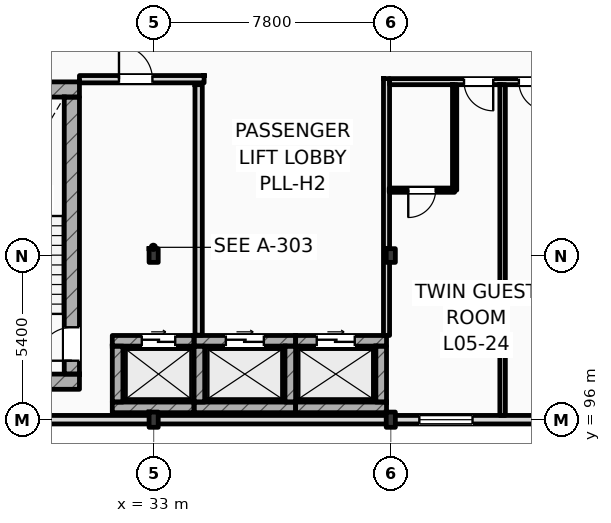
"""IFC4 building model, lengths in metres.
Left out: names, types, materials, properties, quantities, classifications, styles, units other than length and angle.
Written with IfcOpenShell. Run it as: python <this file> out.ifc"""

import sys

from ifc_helpers import new_model, si_unit, direction, frame, frame_2d, origin, origin_2d, place, context, subcontext, project, spatial, rectangle, i_section, extrude, element, fill, save


model = new_model("IFC4")
c1 = context("Model", 3, precision=1e-05, world=origin(), true_north=direction((0.0, 1.0)))
c2 = subcontext(c1, "Body", "Model", "MODEL_VIEW")
j1 = project(units=[si_unit("LENGTHUNIT", "METRE"), si_unit("PLANEANGLEUNIT", "RADIAN")], contexts=[c1])
p1 = place(None, origin())
s1 = spatial("IfcSite", under=j1, at=p1, CompositionType="ELEMENT")
p2 = place(p1, origin())
s2 = spatial("IfcBuilding", under=s1, at=p2, CompositionType="ELEMENT")
p3 = place(p2, frame((0.0, 0.0, 24.6)))
s3 = spatial("IfcBuildingStorey", under=s2, at=p3, CompositionType="ELEMENT", Elevation=24.6)
p4 = place(p3, frame((33.0, 96.0, 0.0), z_axis=(0.0, 0.0, 1.0), x_axis=(1.0, 0.0, 0.0)))
e1 = element("IfcColumn", 1, at=p4, inside=s3, PredefinedType="COLUMN", context=c2, shape_type="SweptSolid", body=[
    extrude(i_section(OverallWidth=0.3, OverallDepth=0.5, WebThickness=0.014, FlangeThickness=0.028, FilletRadius=0.027, at=origin_2d()), origin(), (0.0, 0.0, 1.0), 3.6),
])
p5 = place(p3, frame((33.0, 101.4, 0.0), z_axis=(0.0, 0.0, 1.0), x_axis=(1.0, 0.0, 0.0)))
e2 = element("IfcColumn", 2, at=p5, inside=s3, PredefinedType="COLUMN", context=c2, shape_type="SweptSolid", body=[
    extrude(i_section(OverallWidth=0.3, OverallDepth=0.45, WebThickness=0.014, FlangeThickness=0.026, FilletRadius=0.027, at=origin_2d()), origin(), (0.0, 0.0, 1.0), 3.6),
])
p6 = place(p3, frame((40.8, 96.0, 0.0), z_axis=(0.0, 0.0, 1.0), x_axis=(1.0, 0.0, 0.0)))
e3 = element("IfcColumn", 3, at=p6, inside=s3, PredefinedType="COLUMN", context=c2, shape_type="SweptSolid", body=[
    extrude(i_section(OverallWidth=0.3, OverallDepth=0.5, WebThickness=0.014, FlangeThickness=0.028, FilletRadius=0.027, at=origin_2d()), origin(), (0.0, 0.0, 1.0), 3.6),
])
p7 = place(p3, frame((40.8, 101.4, 0.0), z_axis=(0.0, 0.0, 1.0), x_axis=(1.0, 0.0, 0.0)))
e4 = element("IfcColumn", 4, at=p7, inside=s3, PredefinedType="COLUMN", context=c2, shape_type="SweptSolid", body=[
    extrude(i_section(OverallWidth=0.3, OverallDepth=0.45, WebThickness=0.014, FlangeThickness=0.026, FilletRadius=0.027, at=origin_2d()), origin(), (0.0, 0.0, 1.0), 3.6),
])
for number, where, z_axis, x_axis in (
    (5, (25.4, 106.862, 0.0), (0.0, 0.0, 1.0), (1.0, 0.0, 0.0)),
    (6, (25.4, 97.25, 0.0), (0.0, 0.0, 1.0), (1.0, 0.0, 0.0)),
):
    element("IfcWall", number, at=place(p3, frame(where, z_axis=z_axis, x_axis=x_axis)), inside=s3, PredefinedType="SHEAR", context=c2, shape_type="SweptSolid", body=[
        extrude(rectangle(XDim=5.16, YDim=0.5, at=frame_2d((2.58, 0.0))), origin(), (0.0, 0.0, 1.0), 3.6),
    ])
p8 = place(p3, frame((30.31, 97.5, 0.0), z_axis=(0.0, 0.0, 1.0), x_axis=(0.0, 1.0, 0.0)))
e7 = element("IfcWall", 7, at=p8, inside=s3, PredefinedType="SHEAR", context=c2, shape_type="SweptSolid", body=[
    extrude(rectangle(XDim=9.112, YDim=0.5, at=frame_2d((4.556, 0.0))), origin(), (0.0, 0.0, 1.0), 3.6),
])
p9 = place(p8, frame((0.44, 0.0, 0.0)))
e8 = element("IfcOpeningElement", 8, at=p9, cuts=e7, PredefinedType="OPENING", context=c2, shape_type="SweptSolid", body=[
    extrude(rectangle(XDim=1.1, YDim=2.2, at=frame_2d((0.55, 1.1))), frame((0.0, 0.26, 0.0), z_axis=(0.0, -1.0, 0.0), x_axis=(1.0, 0.0, 0.0)), (0.0, 0.0, 1.0), 0.52),
])
p10 = place(p3, frame((25.2, 96.0, 0.0), z_axis=(0.0, 0.0, 1.0), x_axis=(1.0, 0.0, 0.0)))
e9 = element("IfcWall", 9, at=p10, inside=s3, PredefinedType="STANDARD", context=c2, shape_type="SweptSolid", body=[
    extrude(rectangle(XDim=94.8, YDim=0.28, at=frame_2d((47.4, 0.0))), origin(), (0.0, 0.0, 1.0), 2.78),
])
p11 = place(p10, frame((16.539, 0.0, 0.9)))
e10 = element("IfcOpeningElement", 10, at=p11, cuts=e9, PredefinedType="OPENING", context=c2, shape_type="SweptSolid", body=[
    extrude(rectangle(XDim=1.75, YDim=1.7, at=frame_2d((0.875, 0.85))), frame((0.0, 0.15, 0.0), z_axis=(0.0, -1.0, 0.0), x_axis=(1.0, 0.0, 0.0)), (0.0, 0.0, 1.0), 0.3),
])
p12 = place(p10, frame((20.367, 0.0, 0.9)))
e11 = element("IfcOpeningElement", 11, at=p12, cuts=e9, PredefinedType="OPENING", context=c2, shape_type="SweptSolid", body=[
    extrude(rectangle(XDim=2.0, YDim=1.7, at=frame_2d((1.0, 0.85))), frame((0.0, 0.15, 0.0), z_axis=(0.0, -1.0, 0.0), x_axis=(1.0, 0.0, 0.0)), (0.0, 0.0, 1.0), 0.3),
])
p13 = place(p10, frame((24.326, 0.0, 0.9)))
e12 = element("IfcOpeningElement", 12, at=p13, cuts=e9, PredefinedType="OPENING", context=c2, shape_type="SweptSolid", body=[
    extrude(rectangle(XDim=2.3, YDim=1.7, at=frame_2d((1.15, 0.85))), frame((0.0, 0.15, 0.0), z_axis=(0.0, -1.0, 0.0), x_axis=(1.0, 0.0, 0.0)), (0.0, 0.0, 1.0), 0.3),
])
p14 = place(p10, frame((27.684, 0.0, 0.9)))
e13 = element("IfcOpeningElement", 13, at=p14, cuts=e9, PredefinedType="OPENING", context=c2, shape_type="SweptSolid", body=[
    extrude(rectangle(XDim=2.6, YDim=1.7, at=frame_2d((1.3, 0.85))), frame((0.0, 0.15, 0.0), z_axis=(0.0, -1.0, 0.0), x_axis=(1.0, 0.0, 0.0)), (0.0, 0.0, 1.0), 0.3),
])
p15 = place(p10, frame((32.083, 0.0, 0.9)))
e14 = element("IfcOpeningElement", 14, at=p15, cuts=e9, PredefinedType="OPENING", context=c2, shape_type="SweptSolid", body=[
    extrude(rectangle(XDim=2.419, YDim=1.7, at=frame_2d((1.209, 0.85))), frame((0.0, 0.15, 0.0), z_axis=(0.0, -1.0, 0.0), x_axis=(1.0, 0.0, 0.0)), (0.0, 0.0, 1.0), 0.3),
])
p16 = place(p10, frame((35.322, 0.0, 0.9)))
e15 = element("IfcOpeningElement", 15, at=p16, cuts=e9, PredefinedType="OPENING", context=c2, shape_type="SweptSolid", body=[
    extrude(rectangle(XDim=2.868, YDim=1.7, at=frame_2d((1.434, 0.85))), frame((0.0, 0.15, 0.0), z_axis=(0.0, -1.0, 0.0), x_axis=(1.0, 0.0, 0.0)), (0.0, 0.0, 1.0), 0.3),
])
p17 = place(p10, frame((56.015, 0.0, 0.9)))
e16 = element("IfcOpeningElement", 16, at=p17, cuts=e9, PredefinedType="OPENING", context=c2, shape_type="SweptSolid", body=[
    extrude(rectangle(XDim=1.2, YDim=1.7, at=frame_2d((0.6, 0.85))), frame((0.0, 0.15, 0.0), z_axis=(0.0, -1.0, 0.0), x_axis=(1.0, 0.0, 0.0)), (0.0, 0.0, 1.0), 0.3),
])
p18 = place(p10, frame((59.888, 0.0, 0.9)))
e17 = element("IfcOpeningElement", 17, at=p18, cuts=e9, PredefinedType="OPENING", context=c2, shape_type="SweptSolid", body=[
    extrude(rectangle(XDim=1.35, YDim=1.7, at=frame_2d((0.675, 0.85))), frame((0.0, 0.15, 0.0), z_axis=(0.0, -1.0, 0.0), x_axis=(1.0, 0.0, 0.0)), (0.0, 0.0, 1.0), 0.3),
])
p19 = place(p10, frame((63.799, 0.0, 0.9)))
e18 = element("IfcOpeningElement", 18, at=p19, cuts=e9, PredefinedType="OPENING", context=c2, shape_type="SweptSolid", body=[
    extrude(rectangle(XDim=1.5, YDim=1.7, at=frame_2d((0.75, 0.85))), frame((0.0, 0.15, 0.0), z_axis=(0.0, -1.0, 0.0), x_axis=(1.0, 0.0, 0.0)), (0.0, 0.0, 1.0), 0.3),
])
p20 = place(p10, frame((67.709, 0.0, 0.9)))
e19 = element("IfcOpeningElement", 19, at=p20, cuts=e9, PredefinedType="OPENING", context=c2, shape_type="SweptSolid", body=[
    extrude(rectangle(XDim=1.65, YDim=1.7, at=frame_2d((0.825, 0.85))), frame((0.0, 0.15, 0.0), z_axis=(0.0, -1.0, 0.0), x_axis=(1.0, 0.0, 0.0)), (0.0, 0.0, 1.0), 0.3),
])
p21 = place(p10, frame((71.618, 0.0, 0.9)))
e20 = element("IfcOpeningElement", 20, at=p21, cuts=e9, PredefinedType="OPENING", context=c2, shape_type="SweptSolid", body=[
    extrude(rectangle(XDim=1.8, YDim=1.7, at=frame_2d((0.9, 0.85))), frame((0.0, 0.15, 0.0), z_axis=(0.0, -1.0, 0.0), x_axis=(1.0, 0.0, 0.0)), (0.0, 0.0, 1.0), 0.3),
])
p22 = place(p10, frame((75.129, 0.0, 0.9)))
e21 = element("IfcOpeningElement", 21, at=p22, cuts=e9, PredefinedType="OPENING", context=c2, shape_type="SweptSolid", body=[
    extrude(rectangle(XDim=1.95, YDim=1.7, at=frame_2d((0.975, 0.85))), frame((0.0, 0.15, 0.0), z_axis=(0.0, -1.0, 0.0), x_axis=(1.0, 0.0, 0.0)), (0.0, 0.0, 1.0), 0.3),
])
p23 = place(p10, frame((79.439, 0.0, 0.9)))
e22 = element("IfcOpeningElement", 22, at=p23, cuts=e9, PredefinedType="OPENING", context=c2, shape_type="SweptSolid", body=[
    extrude(rectangle(XDim=2.1, YDim=1.7, at=frame_2d((1.05, 0.85))), frame((0.0, 0.15, 0.0), z_axis=(0.0, -1.0, 0.0), x_axis=(1.0, 0.0, 0.0)), (0.0, 0.0, 1.0), 0.3),
])
p24 = place(p10, frame((83.349, 0.0, 0.9)))
e23 = element("IfcOpeningElement", 23, at=p24, cuts=e9, PredefinedType="OPENING", context=c2, shape_type="SweptSolid", body=[
    extrude(rectangle(XDim=2.25, YDim=1.7, at=frame_2d((1.125, 0.85))), frame((0.0, 0.15, 0.0), z_axis=(0.0, -1.0, 0.0), x_axis=(1.0, 0.0, 0.0)), (0.0, 0.0, 1.0), 0.3),
])
p25 = place(p10, frame((87.258, 0.0, 0.9)))
e24 = element("IfcOpeningElement", 24, at=p25, cuts=e9, PredefinedType="OPENING", context=c2, shape_type="SweptSolid", body=[
    extrude(rectangle(XDim=2.4, YDim=1.7, at=frame_2d((1.2, 0.85))), frame((0.0, 0.15, 0.0), z_axis=(0.0, -1.0, 0.0), x_axis=(1.0, 0.0, 0.0)), (0.0, 0.0, 1.0), 0.3),
])
p26 = place(p10, frame((91.204, 0.0, 0.9)))
e25 = element("IfcOpeningElement", 25, at=p26, cuts=e9, PredefinedType="OPENING", context=c2, shape_type="SweptSolid", body=[
    extrude(rectangle(XDim=2.55, YDim=1.7, at=frame_2d((1.275, 0.85))), frame((0.0, 0.15, 0.0), z_axis=(0.0, -1.0, 0.0), x_axis=(1.0, 0.0, 0.0)), (0.0, 0.0, 1.0), 0.3),
])
p27 = place(p3, frame((31.64, 98.595, 0.0), z_axis=(0.0, 0.0, 1.0), x_axis=(1.0, 0.0, 0.0)))
e26 = element("IfcWall", 26, at=p27, inside=s3, PredefinedType="SHEAR", context=c2, shape_type="SweptSolid", body=[
    extrude(rectangle(XDim=2.69, YDim=0.35, at=frame_2d((1.345, 0.0))), origin(), (0.0, 0.0, 1.0), 3.34),
])
p28 = place(p27, frame((0.97, 0.0, 0.0)))
e27 = element("IfcOpeningElement", 27, at=p28, cuts=e26, PredefinedType="OPENING", context=c2, shape_type="SweptSolid", body=[
    extrude(rectangle(XDim=1.1, YDim=2.2, at=frame_2d((0.55, 1.1))), frame((0.0, 0.185, 0.0), z_axis=(0.0, -1.0, 0.0), x_axis=(1.0, 0.0, 0.0)), (0.0, 0.0, 1.0), 0.37),
])
p29 = place(p3, frame((31.64, 96.405, 0.0), z_axis=(0.0, 0.0, 1.0), x_axis=(1.0, 0.0, 0.0)))
e28 = element("IfcWall", 28, at=p29, inside=s3, PredefinedType="SHEAR", context=c2, shape_type="SweptSolid", body=[
    extrude(rectangle(XDim=2.69, YDim=0.35, at=frame_2d((1.345, 0.0))), origin(), (0.0, 0.0, 1.0), 3.34),
])
p30 = place(p3, frame((31.815, 96.58, 0.0), z_axis=(0.0, 0.0, 1.0), x_axis=(0.0, 1.0, 0.0)))
e29 = element("IfcWall", 29, at=p30, inside=s3, PredefinedType="SHEAR", context=c2, shape_type="SweptSolid", body=[
    extrude(rectangle(XDim=1.84, YDim=0.35, at=frame_2d((0.92, 0.0))), origin(), (0.0, 0.0, 1.0), 3.34),
])
p31 = place(p3, frame((34.33, 98.595, 0.0), z_axis=(0.0, 0.0, 1.0), x_axis=(1.0, 0.0, 0.0)))
e30 = element("IfcWall", 30, at=p31, inside=s3, PredefinedType="SHEAR", context=c2, shape_type="SweptSolid", body=[
    extrude(rectangle(XDim=3.34, YDim=0.35, at=frame_2d((1.67, 0.0))), origin(), (0.0, 0.0, 1.0), 3.34),
])
p32 = place(p31, frame((1.045, 0.0, 0.0)))
e31 = element("IfcOpeningElement", 31, at=p32, cuts=e30, PredefinedType="OPENING", context=c2, shape_type="SweptSolid", body=[
    extrude(rectangle(XDim=1.25, YDim=2.25, at=frame_2d((0.625, 1.125))), frame((0.0, 0.185, 0.0), z_axis=(0.0, -1.0, 0.0), x_axis=(1.0, 0.0, 0.0)), (0.0, 0.0, 1.0), 0.37),
])
p33 = place(p3, frame((34.33, 96.405, 0.0), z_axis=(0.0, 0.0, 1.0), x_axis=(1.0, 0.0, 0.0)))
e32 = element("IfcWall", 32, at=p33, inside=s3, PredefinedType="SHEAR", context=c2, shape_type="SweptSolid", body=[
    extrude(rectangle(XDim=3.34, YDim=0.35, at=frame_2d((1.67, 0.0))), origin(), (0.0, 0.0, 1.0), 3.34),
])
for number, where, z_axis, x_axis in (
    (33, (34.505, 96.58, 0.0), (0.0, 0.0, 1.0), (0.0, 1.0, 0.0)),
    (34, (37.495, 96.58, 0.0), (0.0, 0.0, 1.0), (0.0, 1.0, 0.0)),
):
    element("IfcWall", number, at=place(p3, frame(where, z_axis=z_axis, x_axis=x_axis)), inside=s3, PredefinedType="SHEAR", context=c2, shape_type="SweptSolid", body=[
        extrude(rectangle(XDim=1.84, YDim=0.35, at=frame_2d((0.92, 0.0))), origin(), (0.0, 0.0, 1.0), 3.34),
    ])
p34 = place(p3, frame((37.67, 98.595, 0.0), z_axis=(0.0, 0.0, 1.0), x_axis=(1.0, 0.0, 0.0)))
e35 = element("IfcWall", 35, at=p34, inside=s3, PredefinedType="SHEAR", context=c2, shape_type="SweptSolid", body=[
    extrude(rectangle(XDim=2.99, YDim=0.35, at=frame_2d((1.495, 0.0))), origin(), (0.0, 0.0, 1.0), 3.34),
])
p35 = place(p34, frame((0.695, 0.0, 0.0)))
e36 = element("IfcOpeningElement", 36, at=p35, cuts=e35, PredefinedType="OPENING", context=c2, shape_type="SweptSolid", body=[
    extrude(rectangle(XDim=1.25, YDim=2.25, at=frame_2d((0.625, 1.125))), frame((0.0, 0.185, 0.0), z_axis=(0.0, -1.0, 0.0), x_axis=(1.0, 0.0, 0.0)), (0.0, 0.0, 1.0), 0.37),
])
p36 = place(p3, frame((37.67, 96.405, 0.0), z_axis=(0.0, 0.0, 1.0), x_axis=(1.0, 0.0, 0.0)))
e37 = element("IfcWall", 37, at=p36, inside=s3, PredefinedType="SHEAR", context=c2, shape_type="SweptSolid", body=[
    extrude(rectangle(XDim=2.99, YDim=0.35, at=frame_2d((1.495, 0.0))), origin(), (0.0, 0.0, 1.0), 3.34),
])
p37 = place(p3, frame((40.485, 96.58, 0.0), z_axis=(0.0, 0.0, 1.0), x_axis=(0.0, 1.0, 0.0)))
e38 = element("IfcWall", 38, at=p37, inside=s3, PredefinedType="SHEAR", context=c2, shape_type="SweptSolid", body=[
    extrude(rectangle(XDim=1.84, YDim=0.35, at=frame_2d((0.92, 0.0))), origin(), (0.0, 0.0, 1.0), 2.93),
])
p38 = place(p3, frame((34.48, 98.78, 0.0), z_axis=(0.0, 0.0, 1.0), x_axis=(0.0, 1.0, 0.0)))
e39 = element("IfcWall", 39, at=p38, inside=s3, PredefinedType="STANDARD", context=c2, shape_type="SweptSolid", body=[
    extrude(rectangle(XDim=8.24, YDim=0.24, at=frame_2d((4.12, 0.0))), origin(), (0.0, 0.0, 1.0), 3.34),
])
p39 = place(p3, frame((30.56, 107.2, 0.0), z_axis=(0.0, 0.0, 1.0), x_axis=(1.0, 0.0, 0.0)))
e40 = element("IfcWall", 40, at=p39, inside=s3, PredefinedType="STANDARD", context=c2, shape_type="SweptSolid", body=[
    extrude(rectangle(XDim=4.1, YDim=0.24, at=frame_2d((2.05, 0.0))), origin(), (0.0, 0.0, 1.0), 3.34),
])
p40 = place(p39, frame((1.3, 0.0, 0.0)))
e41 = element("IfcOpeningElement", 41, at=p40, cuts=e40, PredefinedType="OPENING", context=c2, shape_type="SweptSolid", body=[
    extrude(rectangle(XDim=1.1, YDim=2.2, at=frame_2d((0.55, 1.1))), frame((0.0, 0.13, 0.0), z_axis=(0.0, -1.0, 0.0), x_axis=(1.0, 0.0, 0.0)), (0.0, 0.0, 1.0), 0.26),
])
p41 = place(p3, frame((40.76, 107.12, 0.0), z_axis=(0.0, 0.0, 1.0), x_axis=(1.0, 0.0, 0.0)))
e42 = element("IfcWall", 42, at=p41, inside=s3, PredefinedType="PARTITIONING", context=c2, shape_type="SweptSolid", body=[
    extrude(rectangle(XDim=23.44, YDim=0.2, at=frame_2d((11.72, 0.0))), origin(), (0.0, 0.0, 1.0), 3.34),
])
p42 = place(p41, frame((2.449, 0.0, 0.0)))
e43 = element("IfcOpeningElement", 43, at=p42, cuts=e42, PredefinedType="OPENING", context=c2, shape_type="SweptSolid", body=[
    extrude(rectangle(XDim=0.96, YDim=2.2, at=frame_2d((0.48, 1.1))), frame((0.0, 0.11, 0.0), z_axis=(0.0, -1.0, 0.0), x_axis=(1.0, 0.0, 0.0)), (0.0, 0.0, 1.0), 0.22),
])
p43 = place(p41, frame((4.253, 0.0, 0.0)))
e44 = element("IfcOpeningElement", 44, at=p43, cuts=e42, PredefinedType="OPENING", context=c2, shape_type="SweptSolid", body=[
    extrude(rectangle(XDim=0.96, YDim=2.2, at=frame_2d((0.48, 1.1))), frame((0.0, 0.11, 0.0), z_axis=(0.0, -1.0, 0.0), x_axis=(1.0, 0.0, 0.0)), (0.0, 0.0, 1.0), 0.22),
])
p44 = place(p41, frame((10.311, 0.0, 0.0)))
e45 = element("IfcOpeningElement", 45, at=p44, cuts=e42, PredefinedType="OPENING", context=c2, shape_type="SweptSolid", body=[
    extrude(rectangle(XDim=0.96, YDim=2.2, at=frame_2d((0.48, 1.1))), frame((0.0, 0.11, 0.0), z_axis=(0.0, -1.0, 0.0), x_axis=(1.0, 0.0, 0.0)), (0.0, 0.0, 1.0), 0.22),
])
p45 = place(p41, frame((12.069, 0.0, 0.0)))
e46 = element("IfcOpeningElement", 46, at=p45, cuts=e42, PredefinedType="OPENING", context=c2, shape_type="SweptSolid", body=[
    extrude(rectangle(XDim=0.96, YDim=2.2, at=frame_2d((0.48, 1.1))), frame((0.0, 0.11, 0.0), z_axis=(0.0, -1.0, 0.0), x_axis=(1.0, 0.0, 0.0)), (0.0, 0.0, 1.0), 0.22),
])
p46 = place(p41, frame((18.128, 0.0, 0.0)))
e47 = element("IfcOpeningElement", 47, at=p46, cuts=e42, PredefinedType="OPENING", context=c2, shape_type="SweptSolid", body=[
    extrude(rectangle(XDim=0.96, YDim=2.2, at=frame_2d((0.48, 1.1))), frame((0.0, 0.11, 0.0), z_axis=(0.0, -1.0, 0.0), x_axis=(1.0, 0.0, 0.0)), (0.0, 0.0, 1.0), 0.22),
])
p47 = place(p41, frame((19.841, 0.0, 0.0)))
e48 = element("IfcOpeningElement", 48, at=p47, cuts=e42, PredefinedType="OPENING", context=c2, shape_type="SweptSolid", body=[
    extrude(rectangle(XDim=0.96, YDim=2.2, at=frame_2d((0.48, 1.1))), frame((0.0, 0.11, 0.0), z_axis=(0.0, -1.0, 0.0), x_axis=(1.0, 0.0, 0.0)), (0.0, 0.0, 1.0), 0.22),
])
p48 = place(p3, frame((40.66, 98.77, 0.0), z_axis=(0.0, 0.0, 1.0), x_axis=(0.0, 1.0, 0.0)))
e49 = element("IfcWall", 49, at=p48, inside=s3, PredefinedType="PARTITIONING", context=c2, shape_type="SweptSolid", body=[
    extrude(rectangle(XDim=8.45, YDim=0.2, at=frame_2d((4.225, 0.0))), origin(), (0.0, 0.0, 1.0), 2.93),
])
p49 = place(p3, frame((44.478, 96.14, 0.0), z_axis=(0.0, 0.0, 1.0), x_axis=(0.0, 1.0, 0.0)))
e50 = element("IfcWall", 50, at=p49, inside=s3, PredefinedType="PARTITIONING", context=c2, shape_type="SweptSolid", body=[
    extrude(rectangle(XDim=10.88, YDim=0.18, at=frame_2d((5.44, 0.0))), origin(), (0.0, 0.0, 1.0), 3.34),
])
p50 = place(p3, frame((42.9, 103.55, 0.0), z_axis=(0.0, 0.0, 1.0), x_axis=(0.0, 1.0, 0.0)))
e51 = element("IfcWall", 51, at=p50, inside=s3, PredefinedType="PARTITIONING", context=c2, shape_type="SweptSolid", body=[
    extrude(rectangle(XDim=3.47, YDim=0.14, at=frame_2d((1.735, 0.0))), origin(), (0.0, 0.0, 1.0), 3.34),
])
p51 = place(p3, frame((40.75, 103.55, 0.0), z_axis=(0.0, 0.0, 1.0), x_axis=(1.0, 0.0, 0.0)))
e52 = element("IfcWall", 52, at=p51, inside=s3, PredefinedType="PARTITIONING", context=c2, shape_type="SweptSolid", body=[
    extrude(rectangle(XDim=2.15, YDim=0.14, at=frame_2d((1.075, 0.0))), origin(), (0.0, 0.0, 1.0), 3.34),
])
p52 = place(p51, frame((0.625, 0.0, 0.0)))
e53 = element("IfcOpeningElement", 53, at=p52, cuts=e52, PredefinedType="OPENING", context=c2, shape_type="SweptSolid", body=[
    extrude(rectangle(XDim=0.9, YDim=2.1, at=frame_2d((0.45, 1.05))), frame((0.0, 0.08, 0.0), z_axis=(0.0, -1.0, 0.0), x_axis=(1.0, 0.0, 0.0)), (0.0, 0.0, 1.0), 0.16),
])
p53 = place(p11, origin())
e54 = element("IfcWindow", 54, at=p53, inside=s3, PartitioningType="DOUBLE_PANEL_VERTICAL", PredefinedType="WINDOW", context=c2, shape_type="SweptSolid", body=[
    extrude(rectangle(XDim=1.75, YDim=1.7, at=frame_2d((0.875, 0.85))), frame((0.0, 0.03, 0.0), z_axis=(0.0, -1.0, 0.0), x_axis=(1.0, 0.0, 0.0)), (0.0, 0.0, 1.0), 0.06),
])
fill(e10, e54)
p54 = place(p9, origin())
e55 = element("IfcDoor", 55, at=p54, inside=s3, OperationType="SINGLE_SWING_LEFT", PredefinedType="DOOR", context=c2, shape_type="SweptSolid", body=[
    extrude(rectangle(XDim=1.1, YDim=2.2, at=frame_2d((0.55, 1.1))), frame((0.0, 0.025, 0.0), z_axis=(0.0, -1.0, 0.0), x_axis=(1.0, 0.0, 0.0)), (0.0, 0.0, 1.0), 0.05),
])
fill(e8, e55)
p55 = place(p28, origin())
e56 = element("IfcDoor", 56, at=p55, inside=s3, OperationType="SLIDING_TO_LEFT", PredefinedType="DOOR", context=c2, shape_type="SweptSolid", body=[
    extrude(rectangle(XDim=1.1, YDim=2.2, at=frame_2d((0.55, 1.1))), frame((0.0, 0.025, 0.0), z_axis=(0.0, -1.0, 0.0), x_axis=(1.0, 0.0, 0.0)), (0.0, 0.0, 1.0), 0.05),
])
fill(e27, e56)
p56 = place(p32, origin())
e57 = element("IfcDoor", 57, at=p56, inside=s3, OperationType="SLIDING_TO_LEFT", PredefinedType="DOOR", context=c2, shape_type="SweptSolid", body=[
    extrude(rectangle(XDim=1.25, YDim=2.25, at=frame_2d((0.625, 1.125))), frame((0.0, 0.025, 0.0), z_axis=(0.0, -1.0, 0.0), x_axis=(1.0, 0.0, 0.0)), (0.0, 0.0, 1.0), 0.05),
])
fill(e31, e57)
p57 = place(p35, origin())
e58 = element("IfcDoor", 58, at=p57, inside=s3, OperationType="SLIDING_TO_LEFT", PredefinedType="DOOR", context=c2, shape_type="SweptSolid", body=[
    extrude(rectangle(XDim=1.25, YDim=2.25, at=frame_2d((0.625, 1.125))), frame((0.0, 0.025, 0.0), z_axis=(0.0, -1.0, 0.0), x_axis=(1.0, 0.0, 0.0)), (0.0, 0.0, 1.0), 0.05),
])
fill(e36, e58)
p58 = place(p40, origin())
e59 = element("IfcDoor", 59, at=p58, inside=s3, OperationType="SINGLE_SWING_LEFT", PredefinedType="DOOR", context=c2, shape_type="SweptSolid", body=[
    extrude(rectangle(XDim=1.1, YDim=2.2, at=frame_2d((0.55, 1.1))), frame((0.0, 0.025, 0.0), z_axis=(0.0, -1.0, 0.0), x_axis=(1.0, 0.0, 0.0)), (0.0, 0.0, 1.0), 0.05),
])
fill(e41, e59)
p59 = place(p42, frame((0.96, 0.0, 0.0), z_axis=(0.0, 0.0, 1.0), x_axis=(-1.0, 0.0, 0.0)))
e60 = element("IfcDoor", 60, at=p59, inside=s3, OperationType="SINGLE_SWING_RIGHT", PredefinedType="DOOR", context=c2, shape_type="SweptSolid", body=[
    extrude(rectangle(XDim=0.96, YDim=2.2, at=frame_2d((0.48, 1.1))), frame((0.0, 0.025, 0.0), z_axis=(0.0, -1.0, 0.0), x_axis=(1.0, 0.0, 0.0)), (0.0, 0.0, 1.0), 0.05),
])
fill(e43, e60)
p60 = place(p52, frame((0.9, 0.0, 0.0), z_axis=(0.0, 0.0, 1.0), x_axis=(-1.0, 0.0, 0.0)))
e61 = element("IfcDoor", 61, at=p60, inside=s3, OperationType="SINGLE_SWING_LEFT", PredefinedType="DOOR", context=c2, shape_type="SweptSolid", body=[
    extrude(rectangle(XDim=0.9, YDim=2.1, at=frame_2d((0.45, 1.05))), frame((0.0, 0.025, 0.0), z_axis=(0.0, -1.0, 0.0), x_axis=(1.0, 0.0, 0.0)), (0.0, 0.0, 1.0), 0.05),
])
fill(e53, e61)
p61 = place(p43, frame((0.96, 0.0, 0.0), z_axis=(0.0, 0.0, 1.0), x_axis=(-1.0, 0.0, 0.0)))
e62 = element("IfcDoor", 62, at=p61, inside=s3, OperationType="SINGLE_SWING_RIGHT", PredefinedType="DOOR", context=c2, shape_type="SweptSolid", body=[
    extrude(rectangle(XDim=0.96, YDim=2.2, at=frame_2d((0.48, 1.1))), frame((0.0, 0.025, 0.0), z_axis=(0.0, -1.0, 0.0), x_axis=(1.0, 0.0, 0.0)), (0.0, 0.0, 1.0), 0.05),
])
fill(e44, e62)
save(model, sys.argv[1])
